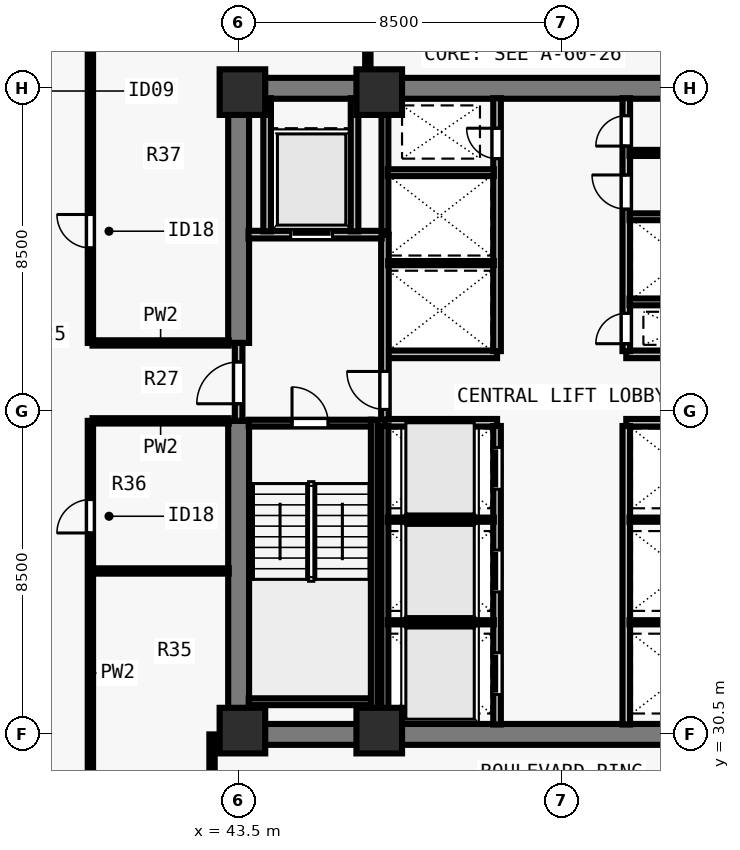
"""IFC4 building model, lengths in metres.
Left out: names, types, materials, properties, quantities, classifications, styles, units other than length and angle.
Written with IfcOpenShell. Run it as: python <this file> out.ifc"""

import sys

from ifc_helpers import new_model, si_unit, direction, frame, frame_2d, origin, origin_2d, place, context, subcontext, project, spatial, rectangle, extrude, element, fill, save


model = new_model("IFC4")
c1 = context("Model", 3, precision=1e-05, world=origin(), true_north=direction((0.0, 1.0)))
c2 = subcontext(c1, "Body", "Model", "MODEL_VIEW")
j1 = project(units=[si_unit("LENGTHUNIT", "METRE"), si_unit("PLANEANGLEUNIT", "RADIAN")], contexts=[c1])
p1 = place(None, origin())
s1 = spatial("IfcSite", under=j1, at=p1, CompositionType="ELEMENT")
p2 = place(p1, origin())
s2 = spatial("IfcBuilding", under=s1, at=p2, CompositionType="ELEMENT")
p3 = place(p2, frame((0.0, 0.0, 86.5)))
s3 = spatial("IfcBuildingStorey", under=s2, at=p3, CompositionType="ELEMENT", Elevation=86.5)
for number, where, z_axis, x_axis in (
    (1, (43.6, 30.6, 0.0), (0.0, 0.0, 1.0), (1.0, 0.0, 0.0)),
    (2, (47.2, 30.6, 0.0), (0.0, 0.0, 1.0), (1.0, 0.0, 0.0)),
    (3, (43.6, 47.4, 0.0), (0.0, 0.0, 1.0), (1.0, 0.0, 0.0)),
    (4, (47.2, 47.4, 0.0), (0.0, 0.0, 1.0), (1.0, 0.0, 0.0)),
):
    element("IfcColumn", number, at=place(p3, frame(where, z_axis=z_axis, x_axis=x_axis)), inside=s3, PredefinedType="COLUMN", context=c2, shape_type="SweptSolid", body=[
        extrude(rectangle(XDim=1.2, YDim=1.2, at=origin_2d()), origin(), (0.0, 0.0, 1.0), 3.5),
    ])
for number, where, z_axis, x_axis in (
    (5, (43.225, 30.5, 0.0), (0.0, 0.0, 1.0), (1.0, 0.0, 0.0)),
    (6, (43.225, 47.5, 0.0), (0.0, 0.0, 1.0), (1.0, 0.0, 0.0)),
):
    element("IfcWall", number, at=place(p3, frame(where, z_axis=z_axis, x_axis=x_axis)), inside=s3, PredefinedType="SHEAR", context=c2, shape_type="SweptSolid", body=[
        extrude(rectangle(XDim=17.55, YDim=0.55, at=frame_2d((8.775, 0.0))), origin(), (0.0, 0.0, 1.0), 3.28),
    ])
p4 = place(p3, frame((43.5, 30.765, 0.0), z_axis=(0.0, 0.0, 1.0), x_axis=(0.0, 1.0, 0.0)))
e7 = element("IfcWall", 7, at=p4, inside=s3, PredefinedType="SHEAR", context=c2, shape_type="SweptSolid", body=[
    extrude(rectangle(XDim=7.985, YDim=0.55, at=frame_2d((3.993, 0.0))), origin(), (0.0, 0.0, 1.0), 3.28),
])
p5 = place(p3, frame((43.5, 40.8, 0.0), z_axis=(0.0, 0.0, 1.0), x_axis=(0.0, 1.0, 0.0)))
e8 = element("IfcWall", 8, at=p5, inside=s3, PredefinedType="SHEAR", context=c2, shape_type="SweptSolid", body=[
    extrude(rectangle(XDim=6.435, YDim=0.55, at=frame_2d((3.218, 0.0))), origin(), (0.0, 0.0, 1.0), 3.28),
])
for number, where, z_axis, x_axis in (
    (9, (47.35, 38.7, 0.0), (0.0, 0.0, 1.0), (1.0, 0.0, 0.0)),
    (10, (47.35, 40.5, 0.0), (0.0, 0.0, 1.0), (1.0, 0.0, 0.0)),
    (11, (53.7, 38.7, 0.0), (0.0, 0.0, 1.0), (1.0, 0.0, 0.0)),
    (12, (53.7, 40.5, 0.0), (0.0, 0.0, 1.0), (1.0, 0.0, 0.0)),
):
    element("IfcWall", number, at=place(p3, frame(where, z_axis=z_axis, x_axis=x_axis)), inside=s3, PredefinedType="SOLIDWALL", context=c2, shape_type="SweptSolid", body=[
        extrude(rectangle(XDim=2.95, YDim=0.2, at=frame_2d((1.475, 0.0))), origin(), (0.0, 0.0, 1.0), 3.28),
    ])
p6 = place(p3, frame((50.3, 30.76, 0.0), z_axis=(0.0, 0.0, 1.0), x_axis=(0.0, 1.0, 0.0)))
e13 = element("IfcWall", 13, at=p6, inside=s3, PredefinedType="SOLIDWALL", context=c2, shape_type="SweptSolid", body=[
    extrude(rectangle(XDim=7.855, YDim=0.2, at=frame_2d((3.927, 0.0))), origin(), (0.0, 0.0, 1.0), 3.28),
])
p7 = place(p6, frame((0.79, 0.0, 0.0)))
e14 = element("IfcOpeningElement", 14, at=p7, cuts=e13, PredefinedType="OPENING", context=c2, shape_type="SweptSolid", body=[
    extrude(rectangle(XDim=1.1, YDim=2.2, at=frame_2d((0.55, 1.1))), frame((0.0, 0.11, 0.0), z_axis=(0.0, -1.0, 0.0), x_axis=(1.0, 0.0, 0.0)), (0.0, 0.0, 1.0), 0.22),
])
p8 = place(p6, frame((3.49, 0.0, 0.0)))
e15 = element("IfcOpeningElement", 15, at=p8, cuts=e13, PredefinedType="OPENING", context=c2, shape_type="SweptSolid", body=[
    extrude(rectangle(XDim=1.1, YDim=2.2, at=frame_2d((0.55, 1.1))), frame((0.0, 0.11, 0.0), z_axis=(0.0, -1.0, 0.0), x_axis=(1.0, 0.0, 0.0)), (0.0, 0.0, 1.0), 0.22),
])
p9 = place(p6, frame((6.19, 0.0, 0.0)))
e16 = element("IfcOpeningElement", 16, at=p9, cuts=e13, PredefinedType="OPENING", context=c2, shape_type="SweptSolid", body=[
    extrude(rectangle(XDim=1.1, YDim=2.2, at=frame_2d((0.55, 1.1))), frame((0.0, 0.11, 0.0), z_axis=(0.0, -1.0, 0.0), x_axis=(1.0, 0.0, 0.0)), (0.0, 0.0, 1.0), 0.22),
])
p10 = place(p3, frame((53.7, 30.76, 0.0), z_axis=(0.0, 0.0, 1.0), x_axis=(0.0, 1.0, 0.0)))
e17 = element("IfcWall", 17, at=p10, inside=s3, PredefinedType="SOLIDWALL", context=c2, shape_type="SweptSolid", body=[
    extrude(rectangle(XDim=7.855, YDim=0.2, at=frame_2d((3.927, 0.0))), origin(), (0.0, 0.0, 1.0), 3.28),
])
p11 = place(p3, frame((50.3, 40.585, 0.0), z_axis=(0.0, 0.0, 1.0), x_axis=(0.0, 1.0, 0.0)))
e18 = element("IfcWall", 18, at=p11, inside=s3, PredefinedType="SOLIDWALL", context=c2, shape_type="SweptSolid", body=[
    extrude(rectangle(XDim=6.655, YDim=0.2, at=frame_2d((3.328, 0.0))), origin(), (0.0, 0.0, 1.0), 3.28),
])
p12 = place(p11, frame((5.065, 0.0, 0.0)))
e19 = element("IfcOpeningElement", 19, at=p12, cuts=e18, PredefinedType="OPENING", context=c2, shape_type="SweptSolid", body=[
    extrude(rectangle(XDim=0.8, YDim=2.08, at=frame_2d((0.4, 1.04))), frame((0.0, 0.11, 0.0), z_axis=(0.0, -1.0, 0.0), x_axis=(1.0, 0.0, 0.0)), (0.0, 0.0, 1.0), 0.22),
])
p13 = place(p3, frame((53.7, 40.585, 0.0), z_axis=(0.0, 0.0, 1.0), x_axis=(0.0, 1.0, 0.0)))
e20 = element("IfcWall", 20, at=p13, inside=s3, PredefinedType="SOLIDWALL", context=c2, shape_type="SweptSolid", body=[
    extrude(rectangle(XDim=6.655, YDim=0.2, at=frame_2d((3.328, 0.0))), origin(), (0.0, 0.0, 1.0), 3.28),
])
p14 = place(p13, frame((0.195, 0.0, 0.0)))
e21 = element("IfcOpeningElement", 21, at=p14, cuts=e20, PredefinedType="OPENING", context=c2, shape_type="SweptSolid", body=[
    extrude(rectangle(XDim=0.8, YDim=2.08, at=frame_2d((0.4, 1.04))), frame((0.0, 0.11, 0.0), z_axis=(0.0, -1.0, 0.0), x_axis=(1.0, 0.0, 0.0)), (0.0, 0.0, 1.0), 0.22),
])
p15 = place(p13, frame((3.735, 0.0, 0.0)))
e22 = element("IfcOpeningElement", 22, at=p15, cuts=e20, PredefinedType="OPENING", context=c2, shape_type="SweptSolid", body=[
    extrude(rectangle(XDim=0.9, YDim=2.12, at=frame_2d((0.45, 1.06))), frame((0.0, 0.11, 0.0), z_axis=(0.0, -1.0, 0.0), x_axis=(1.0, 0.0, 0.0)), (0.0, 0.0, 1.0), 0.22),
])
p16 = place(p13, frame((5.395, 0.0, 0.0)))
e23 = element("IfcOpeningElement", 23, at=p16, cuts=e20, PredefinedType="OPENING", context=c2, shape_type="SweptSolid", body=[
    extrude(rectangle(XDim=0.8, YDim=2.1, at=frame_2d((0.4, 1.05))), frame((0.0, 0.11, 0.0), z_axis=(0.0, -1.0, 0.0), x_axis=(1.0, 0.0, 0.0)), (0.0, 0.0, 1.0), 0.22),
])
p17 = place(p3, frame((43.5, 38.75, 0.0), z_axis=(0.0, 0.0, 1.0), x_axis=(0.0, 1.0, 0.0)))
e24 = element("IfcWall", 24, at=p17, inside=s3, PredefinedType="SOLIDWALL", context=c2, shape_type="SweptSolid", body=[
    extrude(rectangle(XDim=2.05, YDim=0.2, at=frame_2d((1.025, 0.0))), origin(), (0.0, 0.0, 1.0), 3.28),
])
p18 = place(p17, frame((0.45, 0.0, 0.0)))
e25 = element("IfcOpeningElement", 25, at=p18, cuts=e24, PredefinedType="OPENING", context=c2, shape_type="SweptSolid", body=[
    extrude(rectangle(XDim=1.1, YDim=2.15, at=frame_2d((0.55, 1.075))), frame((0.0, 0.11, 0.0), z_axis=(0.0, -1.0, 0.0), x_axis=(1.0, 0.0, 0.0)), (0.0, 0.0, 1.0), 0.22),
])
p19 = place(p3, frame((47.35, 38.785, 0.0), z_axis=(0.0, 0.0, 1.0), x_axis=(0.0, 1.0, 0.0)))
e26 = element("IfcWall", 26, at=p19, inside=s3, PredefinedType="SOLIDWALL", context=c2, shape_type="SweptSolid", body=[
    extrude(rectangle(XDim=4.865, YDim=0.2, at=frame_2d((2.433, 0.0))), origin(), (0.0, 0.0, 1.0), 3.28),
])
p20 = place(p19, frame((0.265, 0.0, 0.0)))
e27 = element("IfcOpeningElement", 27, at=p20, cuts=e26, PredefinedType="OPENING", context=c2, shape_type="SweptSolid", body=[
    extrude(rectangle(XDim=1.0, YDim=2.15, at=frame_2d((0.5, 1.075))), frame((0.0, 0.11, 0.0), z_axis=(0.0, -1.0, 0.0), x_axis=(1.0, 0.0, 0.0)), (0.0, 0.0, 1.0), 0.22),
])
p21 = place(p3, frame((43.76, 43.65, 0.0), z_axis=(0.0, 0.0, 1.0), x_axis=(1.0, 0.0, 0.0)))
e28 = element("IfcWall", 28, at=p21, inside=s3, PredefinedType="SOLIDWALL", context=c2, shape_type="SweptSolid", body=[
    extrude(rectangle(XDim=3.505, YDim=0.2, at=frame_2d((1.752, 0.0))), origin(), (0.0, 0.0, 1.0), 3.28),
])
p22 = place(p21, frame((1.11, 0.0, 0.0)))
e29 = element("IfcOpeningElement", 29, at=p22, cuts=e28, PredefinedType="OPENING", context=c2, shape_type="SweptSolid", body=[
    extrude(rectangle(XDim=1.1, YDim=2.2, at=frame_2d((0.55, 1.1))), frame((0.0, 0.11, 0.0), z_axis=(0.0, -1.0, 0.0), x_axis=(1.0, 0.0, 0.0)), (0.0, 0.0, 1.0), 0.22),
])
for number, where, z_axis, x_axis in (
    (30, (46.55, 43.735, 0.0), (0.0, 0.0, 1.0), (0.0, 1.0, 0.0)),
    (31, (44.25, 43.735, 0.0), (0.0, 0.0, 1.0), (0.0, 1.0, 0.0)),
):
    element("IfcWall", number, at=place(p3, frame(where, z_axis=z_axis, x_axis=x_axis)), inside=s3, PredefinedType="SOLIDWALL", context=c2, shape_type="SweptSolid", body=[
        extrude(rectangle(XDim=3.505, YDim=0.2, at=frame_2d((1.752, 0.0))), origin(), (0.0, 0.0, 1.0), 3.28),
    ])
p23 = place(p3, frame((47.35, 30.76, 0.0), z_axis=(0.0, 0.0, 1.0), x_axis=(0.0, 1.0, 0.0)))
e32 = element("IfcWall", 32, at=p23, inside=s3, PredefinedType="SOLIDWALL", context=c2, shape_type="SweptSolid", body=[
    extrude(rectangle(XDim=7.855, YDim=0.18, at=frame_2d((3.927, 0.0))), origin(), (0.0, 0.0, 1.0), 3.28),
])
for number, where, z_axis, x_axis in (
    (33, (47.425, 33.45, 0.0), (0.0, 0.0, 1.0), (1.0, 0.0, 0.0)),
    (34, (47.425, 36.15, 0.0), (0.0, 0.0, 1.0), (1.0, 0.0, 0.0)),
    (35, (53.785, 33.45, 0.0), (0.0, 0.0, 1.0), (1.0, 0.0, 0.0)),
    (36, (53.785, 36.15, 0.0), (0.0, 0.0, 1.0), (1.0, 0.0, 0.0)),
):
    element("IfcWall", number, at=place(p3, frame(where, z_axis=z_axis, x_axis=x_axis)), inside=s3, PredefinedType="PARTITIONING", context=c2, shape_type="SweptSolid", body=[
        extrude(rectangle(XDim=2.79, YDim=0.11, at=frame_2d((1.395, 0.0))), origin(), (0.0, 0.0, 1.0), 3.28),
    ])
p24 = place(p3, frame((47.35, 43.735, 0.0), z_axis=(0.0, 0.0, 1.0), x_axis=(0.0, 1.0, 0.0)))
e37 = element("IfcWall", 37, at=p24, inside=s3, PredefinedType="SOLIDWALL", context=c2, shape_type="SweptSolid", body=[
    extrude(rectangle(XDim=3.505, YDim=0.18, at=frame_2d((1.752, 0.0))), origin(), (0.0, 0.0, 1.0), 3.28),
])
p25 = place(p3, frame((47.435, 42.9, 0.0), z_axis=(0.0, 0.0, 1.0), x_axis=(1.0, 0.0, 0.0)))
e38 = element("IfcWall", 38, at=p25, inside=s3, PredefinedType="PARTITIONING", context=c2, shape_type="SweptSolid", body=[
    extrude(rectangle(XDim=2.78, YDim=0.11, at=frame_2d((1.39, 0.0))), origin(), (0.0, 0.0, 1.0), 3.28),
])
p26 = place(p3, frame((47.425, 45.28, 0.0), z_axis=(0.0, 0.0, 1.0), x_axis=(1.0, 0.0, 0.0)))
e39 = element("IfcWall", 39, at=p26, inside=s3, PredefinedType="SOLIDWALL", context=c2, shape_type="SweptSolid", body=[
    extrude(rectangle(XDim=2.79, YDim=0.18, at=frame_2d((1.395, 0.0))), origin(), (0.0, 0.0, 1.0), 3.28),
])
p27 = place(p3, frame((53.785, 41.88, 0.0), z_axis=(0.0, 0.0, 1.0), x_axis=(1.0, 0.0, 0.0)))
e40 = element("IfcWall", 40, at=p27, inside=s3, PredefinedType="SOLIDWALL", context=c2, shape_type="SweptSolid", body=[
    extrude(rectangle(XDim=2.78, YDim=0.18, at=frame_2d((1.39, 0.0))), origin(), (0.0, 0.0, 1.0), 3.28),
])
p28 = place(p3, frame((53.785, 44.12, 0.0), z_axis=(0.0, 0.0, 1.0), x_axis=(1.0, 0.0, 0.0)))
e41 = element("IfcWall", 41, at=p28, inside=s3, PredefinedType="SOLIDWALL", context=c2, shape_type="SweptSolid", body=[
    extrude(rectangle(XDim=2.79, YDim=0.18, at=frame_2d((1.395, 0.0))), origin(), (0.0, 0.0, 1.0), 3.28),
])
p29 = place(p3, frame((53.785, 45.8, 0.0), z_axis=(0.0, 0.0, 1.0), x_axis=(1.0, 0.0, 0.0)))
e42 = element("IfcWall", 42, at=p29, inside=s3, PredefinedType="PARTITIONING", context=c2, shape_type="SweptSolid", body=[
    extrude(rectangle(XDim=2.79, YDim=0.16, at=frame_2d((1.395, 0.0))), origin(), (0.0, 0.0, 1.0), 3.28),
])
p30 = place(p3, frame((39.6, 26.505, 0.0), z_axis=(0.0, 0.0, 1.0), x_axis=(0.0, 1.0, 0.0)))
e43 = element("IfcWall", 43, at=p30, inside=s3, PredefinedType="PARTITIONING", context=c2, shape_type="SweptSolid", body=[
    extrude(rectangle(XDim=12.245, YDim=0.14, at=frame_2d((6.123, 0.0))), origin(), (0.0, 0.0, 1.0), 3.28),
])
p31 = place(p30, frame((1.045, 0.0, 0.0)))
e44 = element("IfcOpeningElement", 44, at=p31, cuts=e43, PredefinedType="OPENING", context=c2, shape_type="SweptSolid", body=[
    extrude(rectangle(XDim=0.88, YDim=2.1, at=frame_2d((0.44, 1.05))), frame((0.0, 0.08, 0.0), z_axis=(0.0, -1.0, 0.0), x_axis=(1.0, 0.0, 0.0)), (0.0, 0.0, 1.0), 0.16),
])
p32 = place(p30, frame((9.295, 0.0, 0.0)))
e45 = element("IfcOpeningElement", 45, at=p32, cuts=e43, PredefinedType="OPENING", context=c2, shape_type="SweptSolid", body=[
    extrude(rectangle(XDim=0.88, YDim=2.1, at=frame_2d((0.44, 1.05))), frame((0.0, 0.08, 0.0), z_axis=(0.0, -1.0, 0.0), x_axis=(1.0, 0.0, 0.0)), (0.0, 0.0, 1.0), 0.16),
])
p33 = place(p3, frame((39.6, 40.8, 0.0), z_axis=(0.0, 0.0, 1.0), x_axis=(0.0, 1.0, 0.0)))
e46 = element("IfcWall", 46, at=p33, inside=s3, PredefinedType="PARTITIONING", context=c2, shape_type="SweptSolid", body=[
    extrude(rectangle(XDim=10.695, YDim=0.14, at=frame_2d((5.348, 0.0))), origin(), (0.0, 0.0, 1.0), 3.28),
])
p34 = place(p33, frame((2.5, 0.0, 0.0)))
e47 = element("IfcOpeningElement", 47, at=p34, cuts=e46, PredefinedType="OPENING", context=c2, shape_type="SweptSolid", body=[
    extrude(rectangle(XDim=0.88, YDim=2.1, at=frame_2d((0.44, 1.05))), frame((0.0, 0.08, 0.0), z_axis=(0.0, -1.0, 0.0), x_axis=(1.0, 0.0, 0.0)), (0.0, 0.0, 1.0), 0.16),
])
for number, where, z_axis, x_axis in (
    (48, (39.655, 38.75, 0.0), (0.0, 0.0, 1.0), (1.0, 0.0, 0.0)),
    (49, (39.655, 40.8, 0.0), (0.0, 0.0, 1.0), (1.0, 0.0, 0.0)),
):
    element("IfcWall", number, at=place(p3, frame(where, z_axis=z_axis, x_axis=x_axis)), inside=s3, PredefinedType="PARTITIONING", context=c2, shape_type="SweptSolid", body=[
        extrude(rectangle(XDim=3.585, YDim=0.14, at=frame_2d((1.792, 0.0))), origin(), (0.0, 0.0, 1.0), 3.28),
    ])
p35 = place(p3, frame((42.8, 26.505, 0.0), z_axis=(0.0, 0.0, 1.0), x_axis=(0.0, 1.0, 0.0)))
e50 = element("IfcWall", 50, at=p35, inside=s3, PredefinedType="PARTITIONING", context=c2, shape_type="SweptSolid", body=[
    extrude(rectangle(XDim=3.995, YDim=0.14, at=frame_2d((1.998, 0.0))), origin(), (0.0, 0.0, 1.0), 2.439),
])
p36 = place(p3, frame((46.9, 47.76, 0.0), z_axis=(0.0, 0.0, 1.0), x_axis=(0.0, 1.0, 0.0)))
e51 = element("IfcWall", 51, at=p36, inside=s3, PredefinedType="PARTITIONING", context=c2, shape_type="SweptSolid", body=[
    extrude(rectangle(XDim=3.735, YDim=0.14, at=frame_2d((1.868, 0.0))), origin(), (0.0, 0.0, 1.0), 3.28),
])
p37 = place(p3, frame((39.655, 34.8, 0.0), z_axis=(0.0, 0.0, 1.0), x_axis=(1.0, 0.0, 0.0)))
e52 = element("IfcWall", 52, at=p37, inside=s3, PredefinedType="PARTITIONING", context=c2, shape_type="SweptSolid", body=[
    extrude(rectangle(XDim=3.585, YDim=0.14, at=frame_2d((1.792, 0.0))), origin(), (0.0, 0.0, 1.0), 3.28),
])
p38 = place(p3, frame((43.765, 38.69, 0.0), z_axis=(0.0, 0.0, 1.0), x_axis=(1.0, 0.0, 0.0)))
e53 = element("IfcWall", 53, at=p38, inside=s3, PredefinedType="SOLIDWALL", context=c2, shape_type="SweptSolid", body=[
    extrude(rectangle(XDim=3.23, YDim=0.18, at=frame_2d((1.615, 0.0))), origin(), (0.0, 0.0, 1.0), 3.28),
])
p39 = place(p38, frame((1.14, 0.0, 0.0)))
e54 = element("IfcOpeningElement", 54, at=p39, cuts=e53, PredefinedType="OPENING", context=c2, shape_type="SweptSolid", body=[
    extrude(rectangle(XDim=0.95, YDim=2.15, at=frame_2d((0.475, 1.075))), frame((0.0, 0.1, 0.0), z_axis=(0.0, -1.0, 0.0), x_axis=(1.0, 0.0, 0.0)), (0.0, 0.0, 1.0), 0.2),
])
p40 = place(p3, frame((43.765, 31.36, 0.0), z_axis=(0.0, 0.0, 1.0), x_axis=(1.0, 0.0, 0.0)))
e55 = element("IfcWall", 55, at=p40, inside=s3, PredefinedType="SOLIDWALL", context=c2, shape_type="SweptSolid", body=[
    extrude(rectangle(XDim=3.23, YDim=0.18, at=frame_2d((1.615, 0.0))), origin(), (0.0, 0.0, 1.0), 3.28),
])
p41 = place(p3, frame((47.07, 38.78, 0.0), z_axis=(0.0, 0.0, 1.0), x_axis=(0.0, -1.0, 0.0)))
e56 = element("IfcWall", 56, at=p41, inside=s3, PredefinedType="SOLIDWALL", context=c2, shape_type="SweptSolid", body=[
    extrude(rectangle(XDim=8.017, YDim=0.18, at=frame_2d((4.009, 0.0))), origin(), (0.0, 0.0, 1.0), 3.28),
])
p42 = place(p18, origin())
e57 = element("IfcDoor", 57, at=p42, inside=s3, OperationType="SINGLE_SWING_LEFT", PredefinedType="DOOR", context=c2, shape_type="SweptSolid", body=[
    extrude(rectangle(XDim=1.1, YDim=2.15, at=frame_2d((0.55, 1.075))), frame((0.0, 0.025, 0.0), z_axis=(0.0, -1.0, 0.0), x_axis=(1.0, 0.0, 0.0)), (0.0, 0.0, 1.0), 0.05),
])
fill(e25, e57)
p43 = place(p20, origin())
e58 = element("IfcDoor", 58, at=p43, inside=s3, OperationType="SINGLE_SWING_RIGHT", PredefinedType="DOOR", context=c2, shape_type="SweptSolid", body=[
    extrude(rectangle(XDim=1.0, YDim=2.15, at=frame_2d((0.5, 1.075))), frame((0.0, 0.025, 0.0), z_axis=(0.0, -1.0, 0.0), x_axis=(1.0, 0.0, 0.0)), (0.0, 0.0, 1.0), 0.05),
])
fill(e27, e58)
p44 = place(p22, origin())
e59 = element("IfcDoor", 59, at=p44, inside=s3, OperationType="SLIDING_TO_LEFT", PredefinedType="DOOR", context=c2, shape_type="SweptSolid", body=[
    extrude(rectangle(XDim=1.1, YDim=2.2, at=frame_2d((0.55, 1.1))), frame((0.0, 0.025, 0.0), z_axis=(0.0, -1.0, 0.0), x_axis=(1.0, 0.0, 0.0)), (0.0, 0.0, 1.0), 0.05),
])
fill(e29, e59)
p45 = place(p7, origin())
e60 = element("IfcDoor", 60, at=p45, inside=s3, OperationType="SLIDING_TO_LEFT", PredefinedType="DOOR", context=c2, shape_type="SweptSolid", body=[
    extrude(rectangle(XDim=1.1, YDim=2.2, at=frame_2d((0.55, 1.1))), frame((0.0, 0.025, 0.0), z_axis=(0.0, -1.0, 0.0), x_axis=(1.0, 0.0, 0.0)), (0.0, 0.0, 1.0), 0.05),
])
fill(e14, e60)
p46 = place(p8, origin())
e61 = element("IfcDoor", 61, at=p46, inside=s3, OperationType="SLIDING_TO_LEFT", PredefinedType="DOOR", context=c2, shape_type="SweptSolid", body=[
    extrude(rectangle(XDim=1.1, YDim=2.2, at=frame_2d((0.55, 1.1))), frame((0.0, 0.025, 0.0), z_axis=(0.0, -1.0, 0.0), x_axis=(1.0, 0.0, 0.0)), (0.0, 0.0, 1.0), 0.05),
])
fill(e15, e61)
p47 = place(p9, origin())
e62 = element("IfcDoor", 62, at=p47, inside=s3, OperationType="SLIDING_TO_LEFT", PredefinedType="DOOR", context=c2, shape_type="SweptSolid", body=[
    extrude(rectangle(XDim=1.1, YDim=2.2, at=frame_2d((0.55, 1.1))), frame((0.0, 0.025, 0.0), z_axis=(0.0, -1.0, 0.0), x_axis=(1.0, 0.0, 0.0)), (0.0, 0.0, 1.0), 0.05),
])
fill(e16, e62)
p48 = place(p12, origin())
e63 = element("IfcDoor", 63, at=p48, inside=s3, OperationType="SINGLE_SWING_RIGHT", PredefinedType="DOOR", context=c2, shape_type="SweptSolid", body=[
    extrude(rectangle(XDim=0.8, YDim=2.08, at=frame_2d((0.4, 1.04))), frame((0.0, 0.025, 0.0), z_axis=(0.0, -1.0, 0.0), x_axis=(1.0, 0.0, 0.0)), (0.0, 0.0, 1.0), 0.05),
])
fill(e19, e63)
p49 = place(p14, origin())
e64 = element("IfcDoor", 64, at=p49, inside=s3, OperationType="SINGLE_SWING_LEFT", PredefinedType="DOOR", context=c2, shape_type="SweptSolid", body=[
    extrude(rectangle(XDim=0.8, YDim=2.08, at=frame_2d((0.4, 1.04))), frame((0.0, 0.025, 0.0), z_axis=(0.0, -1.0, 0.0), x_axis=(1.0, 0.0, 0.0)), (0.0, 0.0, 1.0), 0.05),
])
fill(e21, e64)
p50 = place(p15, origin())
e65 = element("IfcDoor", 65, at=p50, inside=s3, OperationType="SINGLE_SWING_RIGHT", PredefinedType="DOOR", context=c2, shape_type="SweptSolid", body=[
    extrude(rectangle(XDim=0.9, YDim=2.12, at=frame_2d((0.45, 1.06))), frame((0.0, 0.025, 0.0), z_axis=(0.0, -1.0, 0.0), x_axis=(1.0, 0.0, 0.0)), (0.0, 0.0, 1.0), 0.05),
])
fill(e22, e65)
p51 = place(p16, origin())
e66 = element("IfcDoor", 66, at=p51, inside=s3, OperationType="SINGLE_SWING_LEFT", PredefinedType="DOOR", context=c2, shape_type="SweptSolid", body=[
    extrude(rectangle(XDim=0.8, YDim=2.1, at=frame_2d((0.4, 1.05))), frame((0.0, 0.025, 0.0), z_axis=(0.0, -1.0, 0.0), x_axis=(1.0, 0.0, 0.0)), (0.0, 0.0, 1.0), 0.05),
])
fill(e23, e66)
p52 = place(p32, origin())
e67 = element("IfcDoor", 67, at=p52, inside=s3, OperationType="SINGLE_SWING_LEFT", PredefinedType="DOOR", context=c2, shape_type="SweptSolid", body=[
    extrude(rectangle(XDim=0.88, YDim=2.1, at=frame_2d((0.44, 1.05))), frame((0.0, 0.025, 0.0), z_axis=(0.0, -1.0, 0.0), x_axis=(1.0, 0.0, 0.0)), (0.0, 0.0, 1.0), 0.05),
])
fill(e45, e67)
p53 = place(p34, origin())
e68 = element("IfcDoor", 68, at=p53, inside=s3, OperationType="SINGLE_SWING_RIGHT", PredefinedType="DOOR", context=c2, shape_type="SweptSolid", body=[
    extrude(rectangle(XDim=0.88, YDim=2.1, at=frame_2d((0.44, 1.05))), frame((0.0, 0.025, 0.0), z_axis=(0.0, -1.0, 0.0), x_axis=(1.0, 0.0, 0.0)), (0.0, 0.0, 1.0), 0.05),
])
fill(e47, e68)
p54 = place(p39, origin())
e69 = element("IfcDoor", 69, at=p54, inside=s3, OperationType="SINGLE_SWING_LEFT", PredefinedType="DOOR", context=c2, shape_type="SweptSolid", body=[
    extrude(rectangle(XDim=0.95, YDim=2.15, at=frame_2d((0.475, 1.075))), frame((0.0, 0.025, 0.0), z_axis=(0.0, -1.0, 0.0), x_axis=(1.0, 0.0, 0.0)), (0.0, 0.0, 1.0), 0.05),
])
fill(e54, e69)
save(model, sys.argv[1])
